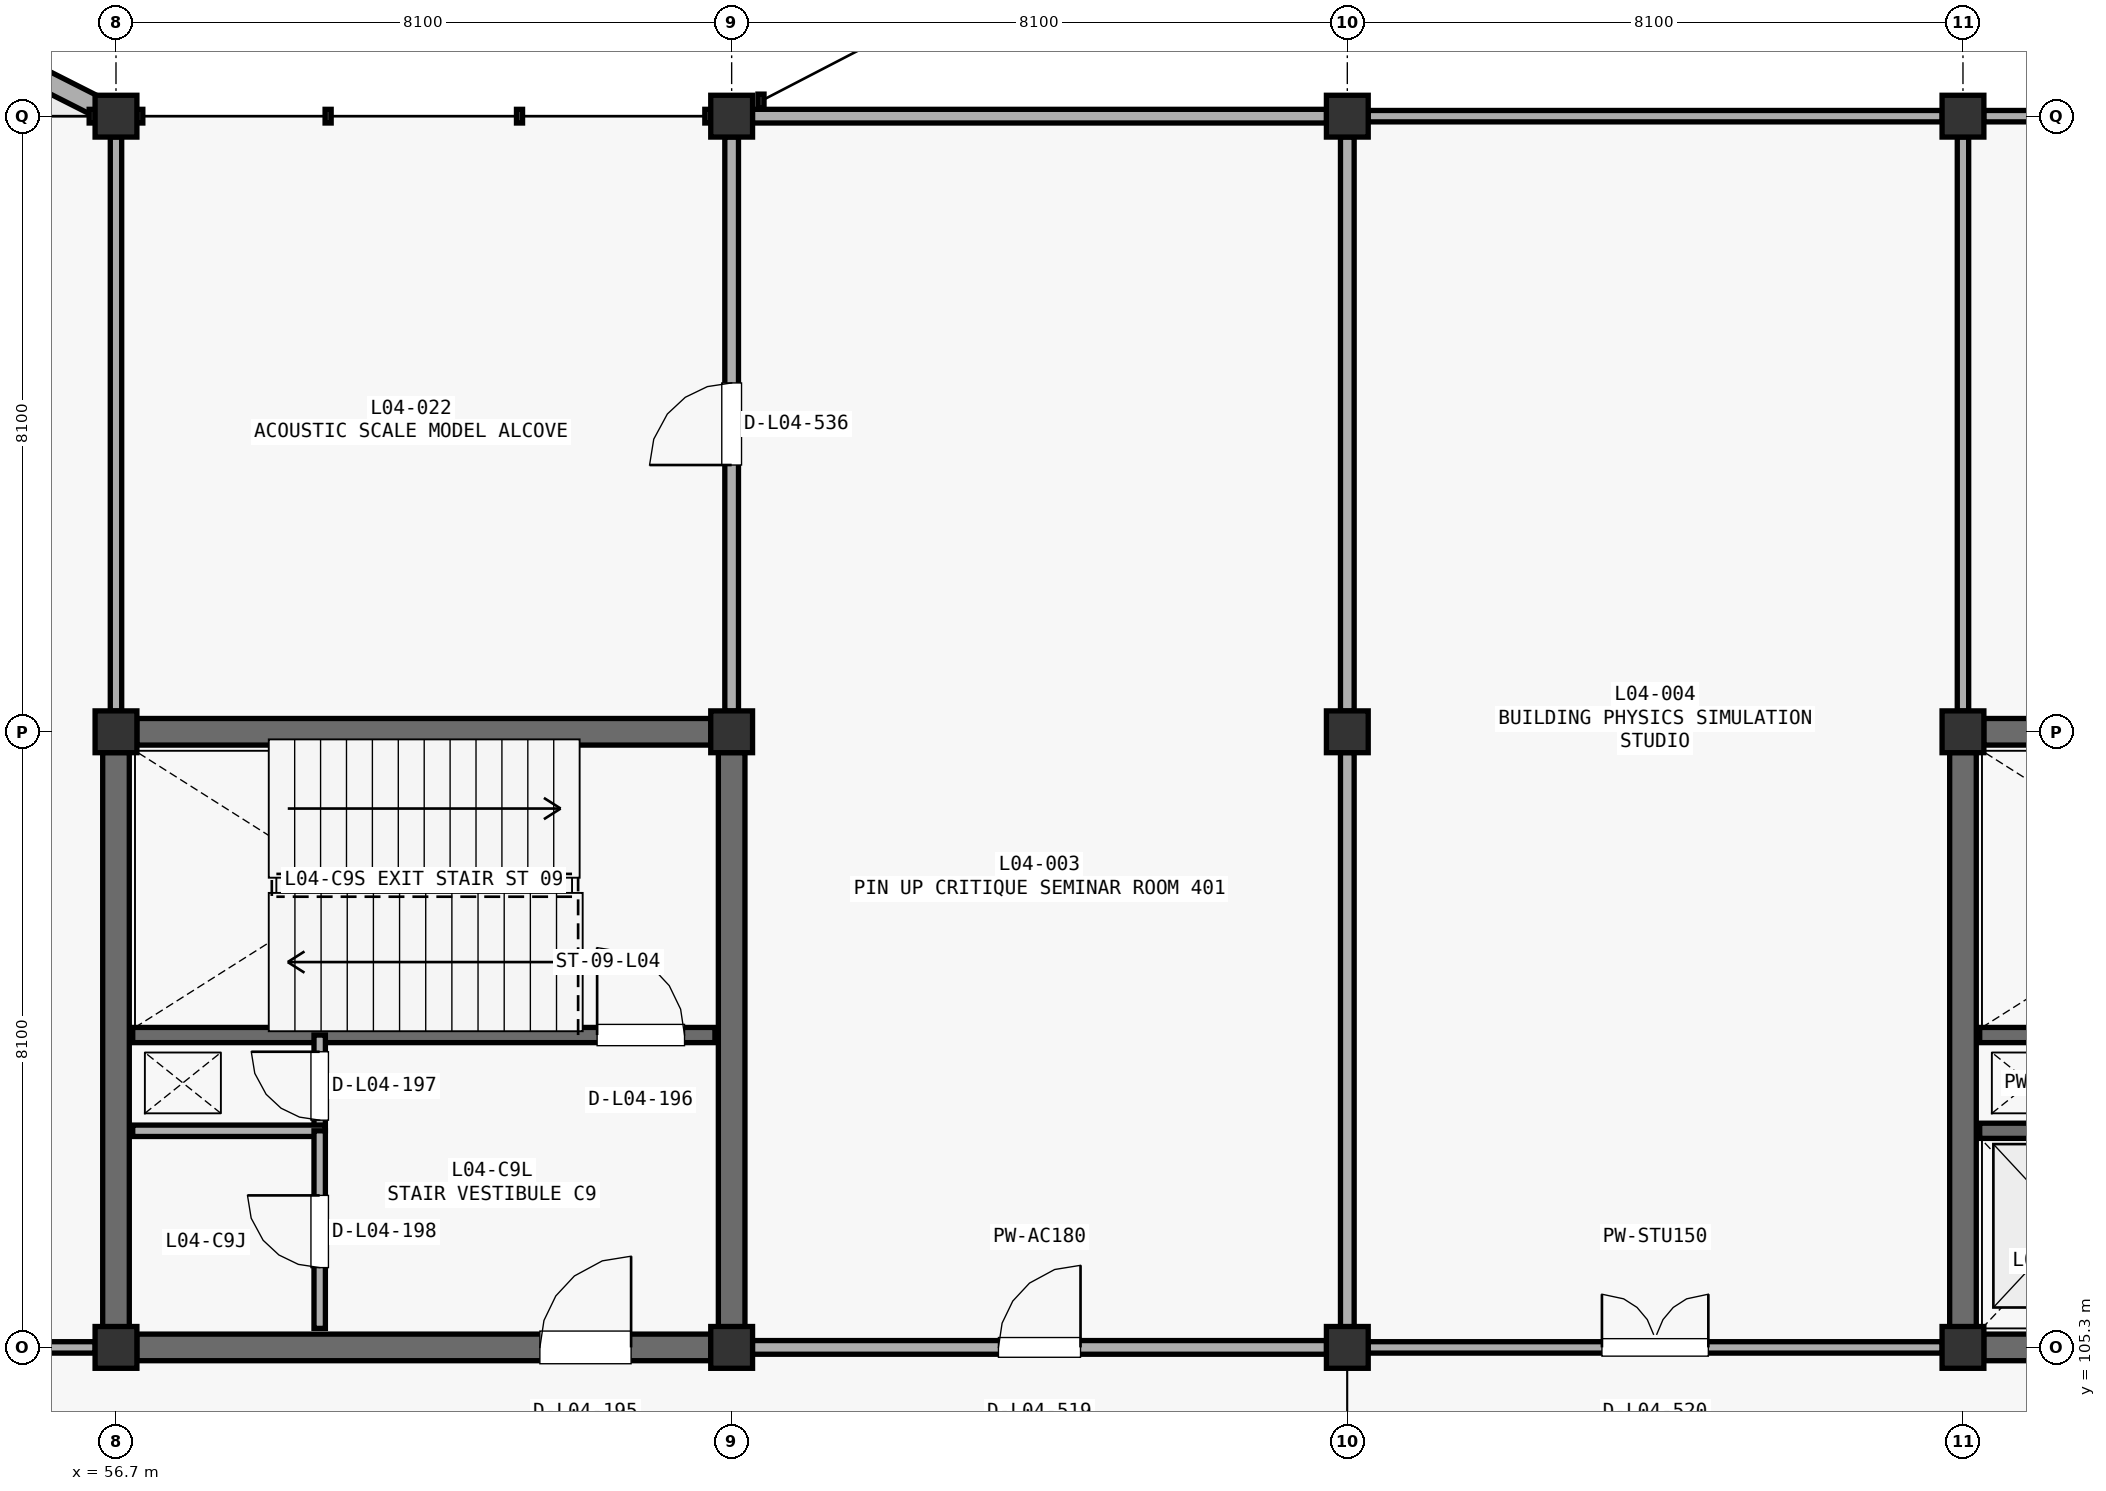
"""IFC4 building model, lengths in metres.
Left out: names, types, materials, properties, quantities, classifications, styles, units other than length and angle.
Written with IfcOpenShell. Run it as: python <this file> out.ifc"""

import sys

from ifc_helpers import new_model, si_unit, direction, frame, frame_2d, origin, origin_2d, place, context, subcontext, project, spatial, polyline, rectangle, outline, extrude, element, fill, save


model = new_model("IFC4")
c1 = context("Model", 3, precision=1e-05, world=origin(), true_north=direction((0.0, 1.0)))
c2 = subcontext(c1, "Body", "Model", "MODEL_VIEW")
j1 = project(units=[si_unit("LENGTHUNIT", "METRE"), si_unit("PLANEANGLEUNIT", "RADIAN")], contexts=[c1])
p1 = place(None, origin())
s1 = spatial("IfcSite", under=j1, at=p1, CompositionType="ELEMENT")
p2 = place(p1, origin())
s2 = spatial("IfcBuilding", under=s1, at=p2, CompositionType="ELEMENT")
p3 = place(p2, frame((0.0, 0.0, 18.53)))
s3 = spatial("IfcBuildingStorey", under=s2, at=p3, CompositionType="ELEMENT", Elevation=18.53)
for number, where, z_axis, x_axis in (
    (1, (56.7, 105.3, 0.0), (0.0, 0.0, 1.0), (1.0, 0.0, 0.0)),
    (2, (56.7, 113.4, 0.0), (0.0, 0.0, 1.0), (1.0, 0.0, 0.0)),
    (3, (56.7, 121.5, 0.0), (0.0, 0.0, 1.0), (1.0, 0.0, 0.0)),
    (4, (64.8, 105.3, 0.0), (0.0, 0.0, 1.0), (1.0, 0.0, 0.0)),
    (5, (64.8, 113.4, 0.0), (0.0, 0.0, 1.0), (1.0, 0.0, 0.0)),
    (6, (64.8, 121.5, 0.0), (0.0, 0.0, 1.0), (1.0, 0.0, 0.0)),
    (7, (72.9, 105.3, 0.0), (0.0, 0.0, 1.0), (1.0, 0.0, 0.0)),
    (8, (72.9, 113.4, 0.0), (0.0, 0.0, 1.0), (1.0, 0.0, 0.0)),
    (9, (72.9, 121.5, 0.0), (0.0, 0.0, 1.0), (1.0, 0.0, 0.0)),
    (10, (81.0, 105.3, 0.0), (0.0, 0.0, 1.0), (1.0, 0.0, 0.0)),
    (11, (81.0, 113.4, 0.0), (0.0, 0.0, 1.0), (1.0, 0.0, 0.0)),
    (12, (81.0, 121.5, 0.0), (0.0, 0.0, 1.0), (1.0, 0.0, 0.0)),
):
    element("IfcColumn", number, at=place(p3, frame(where, z_axis=z_axis, x_axis=x_axis)), inside=s3, PredefinedType="COLUMN", context=c2, shape_type="SweptSolid", body=[
        extrude(rectangle(XDim=0.55, YDim=0.55, at=origin_2d()), origin(), (0.0, 0.0, 1.0), 4.42),
    ])
p4 = place(p3, frame((48.618, 125.591, -0.35), z_axis=(0.0, 0.0, 1.0), x_axis=(0.892206758846, -0.451627168657, 0.0)))
e13 = element("IfcWall", 13, at=p4, inside=s3, PredefinedType="STANDARD", context=c2, shape_type="SweptSolid", body=[
    extrude(outline(polyline([(0.0, 0.0), (9.039, 0.0), (9.039, 0.36), (0.0, 2.154), (0.0, 0.0)])), frame((0.0, 0.13, 0.0), z_axis=(0.0, -1.0, 0.0), x_axis=(1.0, 0.0, 0.0)), (0.0, 0.0, 1.0), 0.26),
])
for number, where, z_axis, x_axis in (
    (14, (81.273, 113.4, 0.0), (0.0, 0.0, 1.0), (1.0, 0.0, 0.0)),
    (15, (81.0, 105.573, 0.0), (0.0, 0.0, 1.0), (0.0, 1.0, 0.0)),
):
    element("IfcWall", number, at=place(p3, frame(where, z_axis=z_axis, x_axis=x_axis)), inside=s3, PredefinedType="SHEAR", context=c2, shape_type="SweptSolid", body=[
        extrude(rectangle(XDim=7.554, YDim=0.35, at=frame_2d((3.777, 0.0))), origin(), (0.0, 0.0, 1.0), 4.162),
    ])
p5 = place(p3, frame((81.273, 105.3, 0.0), z_axis=(0.0, 0.0, 1.0), x_axis=(1.0, 0.0, 0.0)))
e16 = element("IfcWall", 16, at=p5, inside=s3, PredefinedType="SHEAR", context=c2, shape_type="SweptSolid", body=[
    extrude(rectangle(XDim=7.554, YDim=0.35, at=frame_2d((3.777, 0.0))), origin(), (0.0, 0.0, 1.0), 4.162),
])
p6 = place(p5, frame((5.304, 0.0, 0.0)))
e17 = element("IfcOpeningElement", 17, at=p6, cuts=e16, PredefinedType="OPENING", context=c2, shape_type="SweptSolid", body=[
    extrude(rectangle(XDim=1.2, YDim=2.2, at=frame_2d((0.6, 1.1))), frame((0.0, 0.185, 0.0), z_axis=(0.0, -1.0, 0.0), x_axis=(1.0, 0.0, 0.0)), (0.0, 0.0, 1.0), 0.37),
])
p7 = place(p3, frame((81.22, 109.41, 0.0), z_axis=(0.0, 0.0, 1.0), x_axis=(1.0, 0.0, 0.0)))
e18 = element("IfcWall", 18, at=p7, inside=s3, PredefinedType="SHEAR", context=c2, shape_type="SweptSolid", body=[
    extrude(rectangle(XDim=7.66, YDim=0.2, at=frame_2d((3.83, 0.0))), origin(), (0.0, 0.0, 1.0), 4.162),
])
p8 = place(p7, frame((6.11, 0.0, 0.0)))
e19 = element("IfcOpeningElement", 19, at=p8, cuts=e18, PredefinedType="OPENING", context=c2, shape_type="SweptSolid", body=[
    extrude(rectangle(XDim=1.15, YDim=2.2, at=frame_2d((0.575, 1.1))), frame((0.0, 0.11, 0.0), z_axis=(0.0, -1.0, 0.0), x_axis=(1.0, 0.0, 0.0)), (0.0, 0.0, 1.0), 0.22),
])
p9 = place(p3, frame((81.22, 108.15, 0.0), z_axis=(0.0, 0.0, 1.0), x_axis=(1.0, 0.0, 0.0)))
e20 = element("IfcWall", 20, at=p9, inside=s3, PredefinedType="SHEAR", context=c2, shape_type="SweptSolid", body=[
    extrude(rectangle(XDim=2.56, YDim=0.2, at=frame_2d((1.28, 0.0))), origin(), (0.0, 0.0, 1.0), 4.162),
])
p10 = place(p3, frame((56.973, 113.4, 0.0), z_axis=(0.0, 0.0, 1.0), x_axis=(1.0, 0.0, 0.0)))
e21 = element("IfcWall", 21, at=p10, inside=s3, PredefinedType="SHEAR", context=c2, shape_type="SweptSolid", body=[
    extrude(rectangle(XDim=7.554, YDim=0.35, at=frame_2d((3.777, 0.0))), origin(), (0.0, 0.0, 1.0), 4.162),
])
for number, where, z_axis, x_axis in (
    (22, (56.7, 105.573, 0.0), (0.0, 0.0, 1.0), (0.0, 1.0, 0.0)),
    (23, (64.8, 105.573, 0.0), (0.0, 0.0, 1.0), (0.0, 1.0, 0.0)),
):
    element("IfcWall", number, at=place(p3, frame(where, z_axis=z_axis, x_axis=x_axis)), inside=s3, PredefinedType="SHEAR", context=c2, shape_type="SweptSolid", body=[
        extrude(rectangle(XDim=7.554, YDim=0.35, at=frame_2d((3.777, 0.0))), origin(), (0.0, 0.0, 1.0), 4.162),
    ])
p11 = place(p3, frame((56.973, 105.3, 0.0), z_axis=(0.0, 0.0, 1.0), x_axis=(1.0, 0.0, 0.0)))
e24 = element("IfcWall", 24, at=p11, inside=s3, PredefinedType="SHEAR", context=c2, shape_type="SweptSolid", body=[
    extrude(rectangle(XDim=7.554, YDim=0.35, at=frame_2d((3.777, 0.0))), origin(), (0.0, 0.0, 1.0), 4.162),
])
p12 = place(p11, frame((5.304, 0.0, 0.0)))
e25 = element("IfcOpeningElement", 25, at=p12, cuts=e24, PredefinedType="OPENING", context=c2, shape_type="SweptSolid", body=[
    extrude(rectangle(XDim=1.2, YDim=2.2, at=frame_2d((0.6, 1.1))), frame((0.0, 0.185, 0.0), z_axis=(0.0, -1.0, 0.0), x_axis=(1.0, 0.0, 0.0)), (0.0, 0.0, 1.0), 0.37),
])
p13 = place(p3, frame((56.92, 109.41, 0.0), z_axis=(0.0, 0.0, 1.0), x_axis=(1.0, 0.0, 0.0)))
e26 = element("IfcWall", 26, at=p13, inside=s3, PredefinedType="SHEAR", context=c2, shape_type="SweptSolid", body=[
    extrude(rectangle(XDim=7.66, YDim=0.2, at=frame_2d((3.83, 0.0))), origin(), (0.0, 0.0, 1.0), 4.162),
])
p14 = place(p13, frame((6.11, 0.0, 0.0)))
e27 = element("IfcOpeningElement", 27, at=p14, cuts=e26, PredefinedType="OPENING", context=c2, shape_type="SweptSolid", body=[
    extrude(rectangle(XDim=1.15, YDim=2.2, at=frame_2d((0.575, 1.1))), frame((0.0, 0.11, 0.0), z_axis=(0.0, -1.0, 0.0), x_axis=(1.0, 0.0, 0.0)), (0.0, 0.0, 1.0), 0.22),
])
p15 = place(p3, frame((59.38, 108.15, 0.0), z_axis=(0.0, 0.0, 1.0), x_axis=(0.0, 1.0, 0.0)))
e28 = element("IfcWall", 28, at=p15, inside=s3, PredefinedType="PARTITIONING", context=c2, shape_type="SweptSolid", body=[
    extrude(rectangle(XDim=1.26, YDim=0.15, at=frame_2d((0.63, 0.0))), origin(), (0.0, 0.0, 1.0), 4.162),
])
p16 = place(p15, frame((0.14, 0.0, 0.0)))
e29 = element("IfcOpeningElement", 29, at=p16, cuts=e28, PredefinedType="OPENING", context=c2, shape_type="SweptSolid", body=[
    extrude(rectangle(XDim=0.9, YDim=2.15, at=frame_2d((0.45, 1.075))), frame((0.0, 0.085, 0.0), z_axis=(0.0, -1.0, 0.0), x_axis=(1.0, 0.0, 0.0)), (0.0, 0.0, 1.0), 0.17),
])
p17 = place(p3, frame((56.92, 108.15, 0.0), z_axis=(0.0, 0.0, 1.0), x_axis=(1.0, 0.0, 0.0)))
e30 = element("IfcWall", 30, at=p17, inside=s3, PredefinedType="PARTITIONING", context=c2, shape_type="SweptSolid", body=[
    extrude(rectangle(XDim=2.53, YDim=0.15, at=frame_2d((1.265, 0.0))), origin(), (0.0, 0.0, 1.0), 4.162),
])
p18 = place(p3, frame((59.38, 105.55, 0.0), z_axis=(0.0, 0.0, 1.0), x_axis=(0.0, 1.0, 0.0)))
e31 = element("IfcWall", 31, at=p18, inside=s3, PredefinedType="PARTITIONING", context=c2, shape_type="SweptSolid", body=[
    extrude(rectangle(XDim=2.6, YDim=0.15, at=frame_2d((1.3, 0.0))), origin(), (0.0, 0.0, 1.0), 4.162),
])
p19 = place(p18, frame((0.8, 0.0, 0.0)))
e32 = element("IfcOpeningElement", 32, at=p19, cuts=e31, PredefinedType="OPENING", context=c2, shape_type="SweptSolid", body=[
    extrude(rectangle(XDim=0.95, YDim=2.15, at=frame_2d((0.475, 1.075))), frame((0.0, 0.085, 0.0), z_axis=(0.0, -1.0, 0.0), x_axis=(1.0, 0.0, 0.0)), (0.0, 0.0, 1.0), 0.17),
])
p20 = place(p3, frame((65.073, 105.3, 0.0), z_axis=(0.0, 0.0, 1.0), x_axis=(1.0, 0.0, 0.0)))
e33 = element("IfcWall", 33, at=p20, inside=s3, PredefinedType="PARTITIONING", context=c2, shape_type="SweptSolid", body=[
    extrude(rectangle(XDim=7.554, YDim=0.18, at=frame_2d((3.777, 0.0))), origin(), (0.0, 0.0, 1.0), 3.512),
])
p21 = place(p20, frame((3.237, 0.0, 0.0)))
e34 = element("IfcOpeningElement", 34, at=p21, cuts=e33, PredefinedType="OPENING", context=c2, shape_type="SweptSolid", body=[
    extrude(rectangle(XDim=1.08, YDim=2.15, at=frame_2d((0.54, 1.075))), frame((0.0, 0.1, 0.0), z_axis=(0.0, -1.0, 0.0), x_axis=(1.0, 0.0, 0.0)), (0.0, 0.0, 1.0), 0.2),
])
p22 = place(p3, frame((72.9, 105.573, 0.0), z_axis=(0.0, 0.0, 1.0), x_axis=(0.0, 1.0, 0.0)))
e35 = element("IfcWall", 35, at=p22, inside=s3, PredefinedType="PARTITIONING", context=c2, shape_type="SweptSolid", body=[
    extrude(rectangle(XDim=7.554, YDim=0.18, at=frame_2d((3.777, 0.0))), origin(), (0.0, 0.0, 1.0), 3.512),
])
p23 = place(p3, frame((72.9, 113.673, 0.0), z_axis=(0.0, 0.0, 1.0), x_axis=(0.0, 1.0, 0.0)))
e36 = element("IfcWall", 36, at=p23, inside=s3, PredefinedType="PARTITIONING", context=c2, shape_type="SweptSolid", body=[
    extrude(rectangle(XDim=7.554, YDim=0.18, at=frame_2d((3.777, 0.0))), origin(), (0.0, 0.0, 1.0), 3.562),
])
p24 = place(p3, frame((64.8, 113.673, 0.0), z_axis=(0.0, 0.0, 1.0), x_axis=(0.0, 1.0, 0.0)))
e37 = element("IfcWall", 37, at=p24, inside=s3, PredefinedType="PARTITIONING", context=c2, shape_type="SweptSolid", body=[
    extrude(rectangle(XDim=7.554, YDim=0.18, at=frame_2d((3.777, 0.0))), origin(), (0.0, 0.0, 1.0), 3.412),
])
p25 = place(p24, frame((3.237, 0.0, 0.0)))
e38 = element("IfcOpeningElement", 38, at=p25, cuts=e37, PredefinedType="OPENING", context=c2, shape_type="SweptSolid", body=[
    extrude(rectangle(XDim=1.08, YDim=2.15, at=frame_2d((0.54, 1.075))), frame((0.0, 0.1, 0.0), z_axis=(0.0, -1.0, 0.0), x_axis=(1.0, 0.0, 0.0)), (0.0, 0.0, 1.0), 0.2),
])
p26 = place(p3, frame((65.073, 121.5, 0.0), z_axis=(0.0, 0.0, 1.0), x_axis=(1.0, 0.0, 0.0)))
e39 = element("IfcWall", 39, at=p26, inside=s3, PredefinedType="PARTITIONING", context=c2, shape_type="SweptSolid", body=[
    extrude(rectangle(XDim=7.554, YDim=0.18, at=frame_2d((3.777, 0.0))), origin(), (0.0, 0.0, 1.0), 3.312),
])
p27 = place(p3, frame((73.173, 105.3, 0.0), z_axis=(0.0, 0.0, 1.0), x_axis=(1.0, 0.0, 0.0)))
e40 = element("IfcWall", 40, at=p27, inside=s3, PredefinedType="PARTITIONING", context=c2, shape_type="SweptSolid", body=[
    extrude(rectangle(XDim=7.554, YDim=0.15, at=frame_2d((3.777, 0.0))), origin(), (0.0, 0.0, 1.0), 3.562),
])
p28 = place(p27, frame((3.077, 0.0, 0.0)))
e41 = element("IfcOpeningElement", 41, at=p28, cuts=e40, PredefinedType="OPENING", context=c2, shape_type="SweptSolid", body=[
    extrude(rectangle(XDim=1.4, YDim=2.2, at=frame_2d((0.7, 1.1))), frame((0.0, 0.085, 0.0), z_axis=(0.0, -1.0, 0.0), x_axis=(1.0, 0.0, 0.0)), (0.0, 0.0, 1.0), 0.17),
])
p29 = place(p3, frame((81.0, 113.673, 0.0), z_axis=(0.0, 0.0, 1.0), x_axis=(0.0, 1.0, 0.0)))
e42 = element("IfcWall", 42, at=p29, inside=s3, PredefinedType="PARTITIONING", context=c2, shape_type="SweptSolid", body=[
    extrude(rectangle(XDim=7.554, YDim=0.15, at=frame_2d((3.777, 0.0))), origin(), (0.0, 0.0, 1.0), 3.212),
])
p30 = place(p3, frame((73.173, 121.5, 0.0), z_axis=(0.0, 0.0, 1.0), x_axis=(1.0, 0.0, 0.0)))
e43 = element("IfcWall", 43, at=p30, inside=s3, PredefinedType="PARTITIONING", context=c2, shape_type="SweptSolid", body=[
    extrude(rectangle(XDim=7.554, YDim=0.15, at=frame_2d((3.777, 0.0))), origin(), (0.0, 0.0, 1.0), 3.747),
])
p31 = place(p3, frame((48.873, 105.3, 0.0), z_axis=(0.0, 0.0, 1.0), x_axis=(1.0, 0.0, 0.0)))
e44 = element("IfcWall", 44, at=p31, inside=s3, PredefinedType="PARTITIONING", context=c2, shape_type="SweptSolid", body=[
    extrude(rectangle(XDim=7.554, YDim=0.15, at=frame_2d((3.777, 0.0))), origin(), (0.0, 0.0, 1.0), 3.212),
])
p32 = place(p31, frame((2.957, 0.0, 0.0)))
e45 = element("IfcOpeningElement", 45, at=p32, cuts=e44, PredefinedType="OPENING", context=c2, shape_type="SweptSolid", body=[
    extrude(rectangle(XDim=1.64, YDim=2.25, at=frame_2d((0.82, 1.125))), frame((0.0, 0.085, 0.0), z_axis=(0.0, -1.0, 0.0), x_axis=(1.0, 0.0, 0.0)), (0.0, 0.0, 1.0), 0.17),
])
p33 = place(p3, frame((56.7, 113.673, 0.0), z_axis=(0.0, 0.0, 1.0), x_axis=(0.0, 1.0, 0.0)))
e46 = element("IfcWall", 46, at=p33, inside=s3, PredefinedType="PARTITIONING", context=c2, shape_type="SweptSolid", body=[
    extrude(rectangle(XDim=7.554, YDim=0.15, at=frame_2d((3.777, 0.0))), origin(), (0.0, 0.0, 1.0), 3.312),
])
p34 = place(p3, frame((81.273, 121.5, 0.0), z_axis=(0.0, 0.0, 1.0), x_axis=(1.0, 0.0, 0.0)))
e47 = element("IfcWall", 47, at=p34, inside=s3, PredefinedType="PARTITIONING", context=c2, shape_type="SweptSolid", body=[
    extrude(rectangle(XDim=7.554, YDim=0.15, at=frame_2d((3.777, 0.0))), origin(), (0.0, 0.0, 1.0), 3.412),
])
p35 = place(p12, origin())
e48 = element("IfcDoor", 48, at=p35, inside=s3, OperationType="SINGLE_SWING_RIGHT", PredefinedType="DOOR", context=c2, shape_type="SweptSolid", body=[
    extrude(rectangle(XDim=1.2, YDim=2.2, at=frame_2d((0.6, 1.1))), frame((0.0, 0.025, 0.0), z_axis=(0.0, -1.0, 0.0), x_axis=(1.0, 0.0, 0.0)), (0.0, 0.0, 1.0), 0.05),
])
fill(e25, e48)
p36 = place(p14, origin())
e49 = element("IfcDoor", 49, at=p36, inside=s3, OperationType="SINGLE_SWING_LEFT", PredefinedType="DOOR", context=c2, shape_type="SweptSolid", body=[
    extrude(rectangle(XDim=1.15, YDim=2.2, at=frame_2d((0.575, 1.1))), frame((0.0, 0.025, 0.0), z_axis=(0.0, -1.0, 0.0), x_axis=(1.0, 0.0, 0.0)), (0.0, 0.0, 1.0), 0.05),
])
fill(e27, e49)
p37 = place(p16, origin())
e50 = element("IfcDoor", 50, at=p37, inside=s3, OperationType="SINGLE_SWING_RIGHT", PredefinedType="DOOR", context=c2, shape_type="SweptSolid", body=[
    extrude(rectangle(XDim=0.9, YDim=2.15, at=frame_2d((0.45, 1.075))), frame((0.0, 0.025, 0.0), z_axis=(0.0, -1.0, 0.0), x_axis=(1.0, 0.0, 0.0)), (0.0, 0.0, 1.0), 0.05),
])
fill(e29, e50)
p38 = place(p19, origin())
e51 = element("IfcDoor", 51, at=p38, inside=s3, OperationType="SINGLE_SWING_RIGHT", PredefinedType="DOOR", context=c2, shape_type="SweptSolid", body=[
    extrude(rectangle(XDim=0.95, YDim=2.15, at=frame_2d((0.475, 1.075))), frame((0.0, 0.025, 0.0), z_axis=(0.0, -1.0, 0.0), x_axis=(1.0, 0.0, 0.0)), (0.0, 0.0, 1.0), 0.05),
])
fill(e32, e51)
p39 = place(p21, origin())
e52 = element("IfcDoor", 52, at=p39, inside=s3, OperationType="SINGLE_SWING_RIGHT", PredefinedType="DOOR", context=c2, shape_type="SweptSolid", body=[
    extrude(rectangle(XDim=1.08, YDim=2.15, at=frame_2d((0.54, 1.075))), frame((0.0, 0.025, 0.0), z_axis=(0.0, -1.0, 0.0), x_axis=(1.0, 0.0, 0.0)), (0.0, 0.0, 1.0), 0.05),
])
fill(e34, e52)
p40 = place(p28, origin())
e53 = element("IfcDoor", 53, at=p40, inside=s3, OperationType="DOUBLE_SWING_LEFT", PredefinedType="DOOR", context=c2, shape_type="SweptSolid", body=[
    extrude(rectangle(XDim=1.4, YDim=2.2, at=frame_2d((0.7, 1.1))), frame((0.0, 0.025, 0.0), z_axis=(0.0, -1.0, 0.0), x_axis=(1.0, 0.0, 0.0)), (0.0, 0.0, 1.0), 0.05),
])
fill(e41, e53)
p41 = place(p25, origin())
e54 = element("IfcDoor", 54, at=p41, inside=s3, OperationType="SINGLE_SWING_LEFT", PredefinedType="DOOR", context=c2, shape_type="SweptSolid", body=[
    extrude(rectangle(XDim=1.08, YDim=2.15, at=frame_2d((0.54, 1.075))), frame((0.0, 0.025, 0.0), z_axis=(0.0, -1.0, 0.0), x_axis=(1.0, 0.0, 0.0)), (0.0, 0.0, 1.0), 0.05),
])
fill(e38, e54)
save(model, sys.argv[1])
